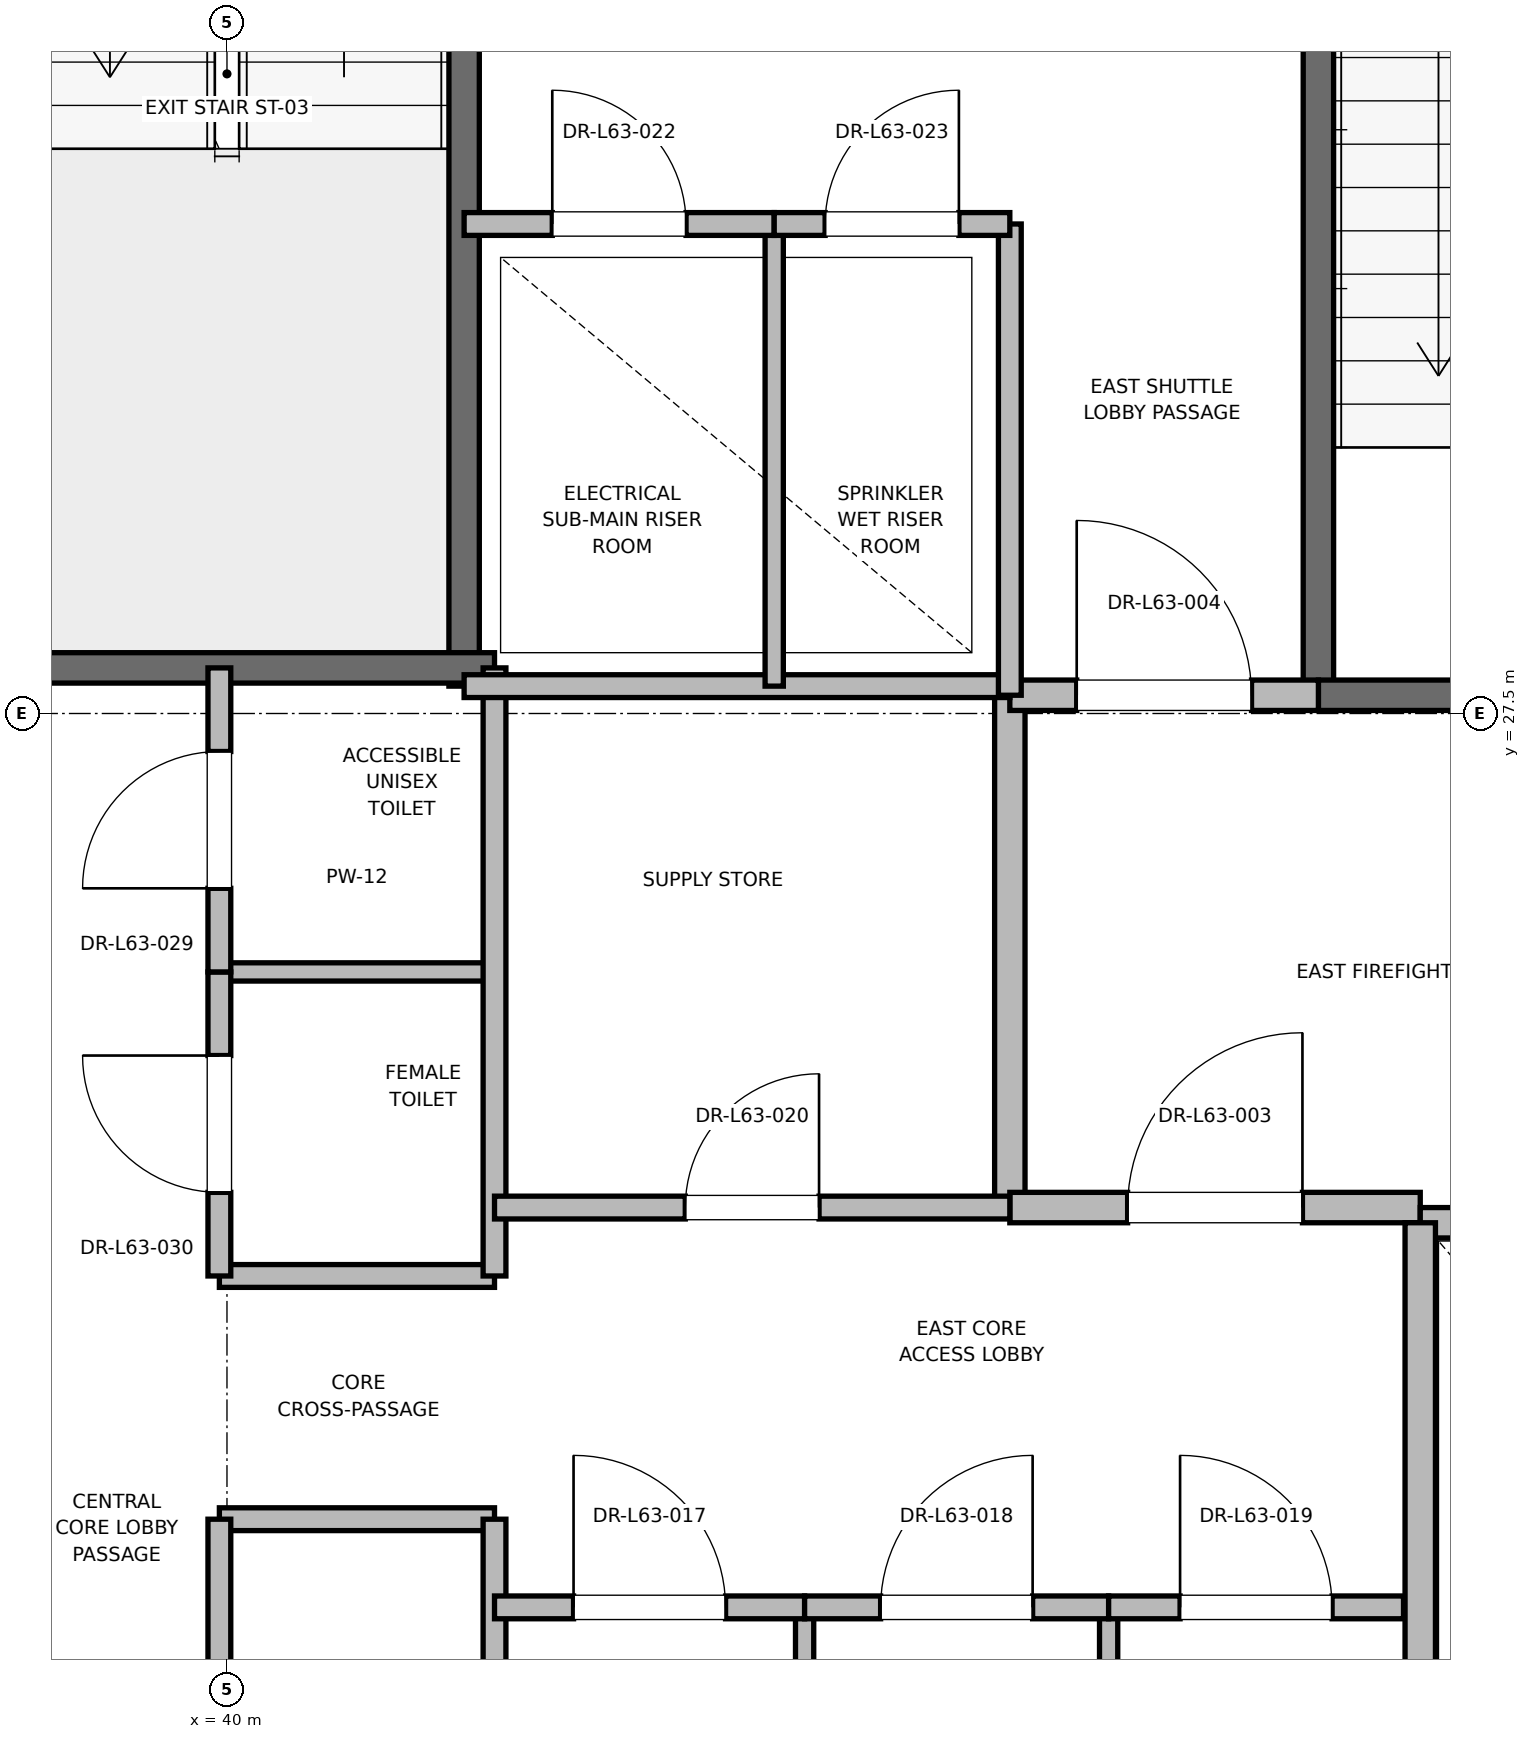
"""IFC4 building model, lengths in metres.
Left out: names, types, materials, properties, quantities, classifications, styles, units other than length and angle.
Written with IfcOpenShell. Run it as: python <this file> out.ifc"""

import sys

from ifc_helpers import new_model, si_unit, direction, frame, frame_2d, origin, place, context, subcontext, project, spatial, rectangle, extrude, element, fill, save


model = new_model("IFC4")
c1 = context("Model", 3, precision=1e-05, world=origin(), true_north=direction((0.0, 1.0)))
c2 = subcontext(c1, "Body", "Model", "MODEL_VIEW")
j1 = project(units=[si_unit("LENGTHUNIT", "METRE"), si_unit("PLANEANGLEUNIT", "RADIAN")], contexts=[c1])
p1 = place(None, origin())
s1 = spatial("IfcSite", under=j1, at=p1, CompositionType="ELEMENT")
p2 = place(p1, origin())
s2 = spatial("IfcBuilding", under=s1, at=p2, CompositionType="ELEMENT")
p3 = place(p2, frame((0.0, 0.0, 271.2)))
s3 = spatial("IfcBuildingStorey", under=s2, at=p3, CompositionType="ELEMENT", Elevation=271.2)
p4 = place(p3, frame((47.18, 27.62, 0.0), z_axis=(0.0, 0.0, 1.0), x_axis=(0.0, 1.0, 0.0)))
e1 = element("IfcWall", 1, at=p4, inside=s3, PredefinedType="SOLIDWALL", context=c2, shape_type="SweptSolid", body=[
    extrude(rectangle(XDim=8.18, YDim=0.2, at=frame_2d((4.09, 0.0))), origin(), (0.0, 0.0, 1.0), 3.785),
])
p5 = place(p3, frame((47.18, 27.62, 0.0), z_axis=(0.0, 0.0, 1.0), x_axis=(1.0, 0.0, 0.0)))
e2 = element("IfcWall", 2, at=p5, inside=s3, PredefinedType="SOLIDWALL", context=c2, shape_type="SweptSolid", body=[
    extrude(rectangle(XDim=3.12, YDim=0.2, at=frame_2d((1.56, 0.0))), origin(), (0.0, 0.0, 1.0), 3.785),
])
p6 = place(p5, frame((1.01, 0.0, 0.0)))
e3 = element("IfcOpeningElement", 3, at=p6, cuts=e2, PredefinedType="OPENING", context=c2, shape_type="SweptSolid", body=[
    extrude(rectangle(XDim=1.1, YDim=2.15, at=frame_2d((0.55, 1.075))), frame((0.0, 0.1, 0.0), z_axis=(0.0, -1.0, 0.0), x_axis=(1.0, 0.0, 0.0)), (0.0, 0.0, 1.0), 0.2),
])
p7 = place(p3, frame((41.56, 27.68, 0.0), z_axis=(0.0, 0.0, 1.0), x_axis=(0.0, 1.0, 0.0)))
e4 = element("IfcWall", 4, at=p7, inside=s3, PredefinedType="SOLIDWALL", context=c2, shape_type="SweptSolid", body=[
    extrude(rectangle(XDim=8.57, YDim=0.2, at=frame_2d((4.285, 0.0))), origin(), (0.0, 0.0, 1.0), 3.785),
])
p8 = place(p3, frame((38.44, 27.8, 0.0), z_axis=(0.0, 0.0, 1.0), x_axis=(1.0, 0.0, 0.0)))
e5 = element("IfcWall", 5, at=p8, inside=s3, PredefinedType="SOLIDWALL", context=c2, shape_type="SweptSolid", body=[
    extrude(rectangle(XDim=3.32, YDim=0.2, at=frame_2d((1.66, 0.0))), origin(), (0.0, 0.0, 1.0), 3.785),
])
p9 = place(p3, frame((45.15, 24.25, 0.0), z_axis=(0.0, 0.0, 1.0), x_axis=(0.0, 1.0, 0.0)))
e6 = element("IfcWall", 6, at=p9, inside=s3, PredefinedType="PARTITIONING", context=c2, shape_type="SweptSolid", body=[
    extrude(rectangle(XDim=3.37, YDim=0.2, at=frame_2d((1.685, 0.0))), origin(), (0.0, 0.0, 1.0), 3.785),
])
p10 = place(p3, frame((45.15, 24.25, 0.0), z_axis=(0.0, 0.0, 1.0), x_axis=(1.0, 0.0, 0.0)))
e7 = element("IfcWall", 7, at=p10, inside=s3, PredefinedType="PARTITIONING", context=c2, shape_type="SweptSolid", body=[
    extrude(rectangle(XDim=2.7, YDim=0.2, at=frame_2d((1.35, 0.0))), origin(), (0.0, 0.0, 1.0), 3.785),
])
p11 = place(p10, frame((0.775, 0.0, 0.0)))
e8 = element("IfcOpeningElement", 8, at=p11, cuts=e7, PredefinedType="OPENING", context=c2, shape_type="SweptSolid", body=[
    extrude(rectangle(XDim=1.15, YDim=2.2, at=frame_2d((0.575, 1.1))), frame((0.0, 0.1, 0.0), z_axis=(0.0, -1.0, 0.0), x_axis=(1.0, 0.0, 0.0)), (0.0, 0.0, 1.0), 0.2),
])
p12 = place(p3, frame((45.15, 27.62, 0.0), z_axis=(0.0, 0.0, 1.0), x_axis=(1.0, 0.0, 0.0)))
e9 = element("IfcWall", 9, at=p12, inside=s3, PredefinedType="PARTITIONING", context=c2, shape_type="SweptSolid", body=[
    extrude(rectangle(XDim=2.03, YDim=0.2, at=frame_2d((1.015, 0.0))), origin(), (0.0, 0.0, 1.0), 3.785),
])
p13 = place(p12, frame((0.44, 0.0, 0.0)))
e10 = element("IfcOpeningElement", 10, at=p13, cuts=e9, PredefinedType="OPENING", context=c2, shape_type="SweptSolid", body=[
    extrude(rectangle(XDim=1.15, YDim=2.2, at=frame_2d((0.575, 1.1))), frame((0.0, 0.1, 0.0), z_axis=(0.0, -1.0, 0.0), x_axis=(1.0, 0.0, 0.0)), (0.0, 0.0, 1.0), 0.2),
])
p14 = place(p3, frame((50.45, 24.15, 0.0), z_axis=(0.0, 0.0, 1.0), x_axis=(-1.0, 0.0, 0.0)))
e11 = element("IfcWall", 11, at=p14, inside=s3, PredefinedType="SOLIDWALL", context=c2, shape_type="SweptSolid", body=[
    extrude(rectangle(XDim=2.6, YDim=0.2, at=frame_2d((1.3, 0.0))), origin(), (0.0, 0.0, 1.0), 2.865),
])
p15 = place(p14, frame((0.75, 0.0, 0.0)))
e12 = element("IfcOpeningElement", 12, at=p15, cuts=e11, PredefinedType="OPENING", context=c2, shape_type="SweptSolid", body=[
    extrude(rectangle(XDim=1.1, YDim=2.2, at=frame_2d((0.55, 1.1))), frame((0.0, 0.1, 0.0), z_axis=(0.0, -1.0, 0.0), x_axis=(1.0, 0.0, 0.0)), (0.0, 0.0, 1.0), 0.2),
])
p16 = place(p3, frame((47.85, 24.15, 0.0), z_axis=(0.0, 0.0, 1.0), x_axis=(0.0, -1.0, 0.0)))
e13 = element("IfcWall", 13, at=p16, inside=s3, PredefinedType="SOLIDWALL", context=c2, shape_type="SweptSolid", body=[
    extrude(rectangle(XDim=3.0, YDim=0.2, at=frame_2d((1.5, 0.0))), origin(), (0.0, 0.0, 1.0), 3.785),
])
for number, where, z_axis, x_axis in (
    (14, (39.95, 22.2, 0.0), (0.0, 0.0, 1.0), (1.0, 0.0, 0.0)),
    (15, (39.95, 23.8, 0.0), (0.0, 0.0, 1.0), (1.0, 0.0, 0.0)),
):
    element("IfcWall", number, at=place(p3, frame(where, z_axis=z_axis, x_axis=x_axis)), inside=s3, PredefinedType="PARTITIONING", context=c2, shape_type="SweptSolid", body=[
        extrude(rectangle(XDim=1.81, YDim=0.15, at=frame_2d((0.905, 0.0))), origin(), (0.0, 0.0, 1.0), 2.85),
    ])
p17 = place(p3, frame((39.95, 25.8, 0.0), z_axis=(0.0, 0.0, 1.0), x_axis=(1.0, 0.0, 0.0)))
e16 = element("IfcWall", 16, at=p17, inside=s3, PredefinedType="PARTITIONING", context=c2, shape_type="SweptSolid", body=[
    extrude(rectangle(XDim=1.81, YDim=0.12, at=frame_2d((0.905, 0.0))), origin(), (0.0, 0.0, 1.0), 2.85),
])
p18 = place(p3, frame((41.76, 18.6, 0.0), z_axis=(0.0, 0.0, 1.0), x_axis=(0.0, 1.0, 0.0)))
e17 = element("IfcWall", 17, at=p18, inside=s3, PredefinedType="PARTITIONING", context=c2, shape_type="SweptSolid", body=[
    extrude(rectangle(XDim=3.6, YDim=0.15, at=frame_2d((1.8, 0.0))), origin(), (0.0, 0.0, 1.0), 2.85),
])
p19 = place(p3, frame((41.76, 23.8, 0.0), z_axis=(0.0, 0.0, 1.0), x_axis=(0.0, 1.0, 0.0)))
e18 = element("IfcWall", 18, at=p19, inside=s3, PredefinedType="PARTITIONING", context=c2, shape_type="SweptSolid", body=[
    extrude(rectangle(XDim=4.0, YDim=0.15, at=frame_2d((2.0, 0.0))), origin(), (0.0, 0.0, 1.0), 2.85),
])
p20 = place(p3, frame((39.95, 19.2, 0.0), z_axis=(0.0, 0.0, 1.0), x_axis=(0.0, 1.0, 0.0)))
e19 = element("IfcWall", 19, at=p20, inside=s3, PredefinedType="PARTITIONING", context=c2, shape_type="SweptSolid", body=[
    extrude(rectangle(XDim=3.0, YDim=0.15, at=frame_2d((1.5, 0.0))), origin(), (0.0, 0.0, 1.0), 2.85),
])
p21 = place(p20, frame((1.05, 0.0, 0.0)))
e20 = element("IfcOpeningElement", 20, at=p21, cuts=e19, PredefinedType="OPENING", context=c2, shape_type="SweptSolid", body=[
    extrude(rectangle(XDim=0.9, YDim=2.1, at=frame_2d((0.45, 1.05))), frame((0.0, 0.075, 0.0), z_axis=(0.0, -1.0, 0.0), x_axis=(1.0, 0.0, 0.0)), (0.0, 0.0, 1.0), 0.15),
])
p22 = place(p3, frame((39.95, 23.8, 0.0), z_axis=(0.0, 0.0, 1.0), x_axis=(0.0, 1.0, 0.0)))
e21 = element("IfcWall", 21, at=p22, inside=s3, PredefinedType="PARTITIONING", context=c2, shape_type="SweptSolid", body=[
    extrude(rectangle(XDim=2.0, YDim=0.15, at=frame_2d((1.0, 0.0))), origin(), (0.0, 0.0, 1.0), 2.85),
])
p23 = place(p22, frame((0.55, 0.0, 0.0)))
e22 = element("IfcOpeningElement", 22, at=p23, cuts=e21, PredefinedType="OPENING", context=c2, shape_type="SweptSolid", body=[
    extrude(rectangle(XDim=0.9, YDim=2.1, at=frame_2d((0.45, 1.05))), frame((0.0, 0.075, 0.0), z_axis=(0.0, -1.0, 0.0), x_axis=(1.0, 0.0, 0.0)), (0.0, 0.0, 1.0), 0.15),
])
p24 = place(p3, frame((39.95, 25.8, 0.0), z_axis=(0.0, 0.0, 1.0), x_axis=(0.0, 1.0, 0.0)))
e23 = element("IfcWall", 23, at=p24, inside=s3, PredefinedType="PARTITIONING", context=c2, shape_type="SweptSolid", body=[
    extrude(rectangle(XDim=2.0, YDim=0.15, at=frame_2d((1.0, 0.0))), origin(), (0.0, 0.0, 1.0), 2.85),
])
p25 = place(p24, frame((0.55, 0.0, 0.0)))
e24 = element("IfcOpeningElement", 24, at=p25, cuts=e23, PredefinedType="OPENING", context=c2, shape_type="SweptSolid", body=[
    extrude(rectangle(XDim=0.9, YDim=2.1, at=frame_2d((0.45, 1.05))), frame((0.0, 0.075, 0.0), z_axis=(0.0, -1.0, 0.0), x_axis=(1.0, 0.0, 0.0)), (0.0, 0.0, 1.0), 0.15),
])
p26 = place(p3, frame((41.56, 27.68, 0.0), z_axis=(0.0, 0.0, 1.0), x_axis=(1.0, 0.0, 0.0)))
e25 = element("IfcWall", 25, at=p26, inside=s3, PredefinedType="PARTITIONING", context=c2, shape_type="SweptSolid", body=[
    extrude(rectangle(XDim=3.59, YDim=0.15, at=frame_2d((1.795, 0.0))), origin(), (0.0, 0.0, 1.0), 2.85),
])
for number, where, z_axis, x_axis in (
    (26, (43.8, 18.6, 0.0), (0.0, 0.0, 1.0), (0.0, 1.0, 0.0)),
    (27, (45.8, 18.6, 0.0), (0.0, 0.0, 1.0), (0.0, 1.0, 0.0)),
):
    element("IfcWall", number, at=place(p3, frame(where, z_axis=z_axis, x_axis=x_axis)), inside=s3, PredefinedType="PARTITIONING", context=c2, shape_type="SweptSolid", body=[
        extrude(rectangle(XDim=3.02, YDim=0.12, at=frame_2d((1.51, 0.0))), origin(), (0.0, 0.0, 1.0), 2.85),
    ])
p27 = place(p3, frame((41.76, 21.62, 0.0), z_axis=(0.0, 0.0, 1.0), x_axis=(1.0, 0.0, 0.0)))
e28 = element("IfcWall", 28, at=p27, inside=s3, PredefinedType="PARTITIONING", context=c2, shape_type="SweptSolid", body=[
    extrude(rectangle(XDim=2.04, YDim=0.15, at=frame_2d((1.02, 0.0))), origin(), (0.0, 0.0, 1.0), 2.85),
])
p28 = place(p27, frame((0.52, 0.0, 0.0)))
e29 = element("IfcOpeningElement", 29, at=p28, cuts=e28, PredefinedType="OPENING", context=c2, shape_type="SweptSolid", body=[
    extrude(rectangle(XDim=1.0, YDim=2.15, at=frame_2d((0.5, 1.075))), frame((0.0, 0.075, 0.0), z_axis=(0.0, -1.0, 0.0), x_axis=(1.0, 0.0, 0.0)), (0.0, 0.0, 1.0), 0.15),
])
p29 = place(p3, frame((43.8, 21.62, 0.0), z_axis=(0.0, 0.0, 1.0), x_axis=(1.0, 0.0, 0.0)))
e30 = element("IfcWall", 30, at=p29, inside=s3, PredefinedType="PARTITIONING", context=c2, shape_type="SweptSolid", body=[
    extrude(rectangle(XDim=2.0, YDim=0.15, at=frame_2d((1.0, 0.0))), origin(), (0.0, 0.0, 1.0), 2.85),
])
p30 = place(p29, frame((0.5, 0.0, 0.0)))
e31 = element("IfcOpeningElement", 31, at=p30, cuts=e30, PredefinedType="OPENING", context=c2, shape_type="SweptSolid", body=[
    extrude(rectangle(XDim=1.0, YDim=2.15, at=frame_2d((0.5, 1.075))), frame((0.0, 0.075, 0.0), z_axis=(0.0, -1.0, 0.0), x_axis=(1.0, 0.0, 0.0)), (0.0, 0.0, 1.0), 0.15),
])
p31 = place(p3, frame((45.8, 21.62, 0.0), z_axis=(0.0, 0.0, 1.0), x_axis=(1.0, 0.0, 0.0)))
e32 = element("IfcWall", 32, at=p31, inside=s3, PredefinedType="PARTITIONING", context=c2, shape_type="SweptSolid", body=[
    extrude(rectangle(XDim=1.94, YDim=0.15, at=frame_2d((0.97, 0.0))), origin(), (0.0, 0.0, 1.0), 2.85),
])
p32 = place(p31, frame((0.47, 0.0, 0.0)))
e33 = element("IfcOpeningElement", 33, at=p32, cuts=e32, PredefinedType="OPENING", context=c2, shape_type="SweptSolid", body=[
    extrude(rectangle(XDim=1.0, YDim=2.15, at=frame_2d((0.5, 1.075))), frame((0.0, 0.075, 0.0), z_axis=(0.0, -1.0, 0.0), x_axis=(1.0, 0.0, 0.0)), (0.0, 0.0, 1.0), 0.15),
])
p33 = place(p3, frame((41.76, 24.25, 0.0), z_axis=(0.0, 0.0, 1.0), x_axis=(1.0, 0.0, 0.0)))
e34 = element("IfcWall", 34, at=p33, inside=s3, PredefinedType="PARTITIONING", context=c2, shape_type="SweptSolid", body=[
    extrude(rectangle(XDim=3.39, YDim=0.15, at=frame_2d((1.695, 0.0))), origin(), (0.0, 0.0, 1.0), 2.85),
])
p34 = place(p33, frame((1.255, 0.0, 0.0)))
e35 = element("IfcOpeningElement", 35, at=p34, cuts=e34, PredefinedType="OPENING", context=c2, shape_type="SweptSolid", body=[
    extrude(rectangle(XDim=0.88, YDim=2.1, at=frame_2d((0.44, 1.05))), frame((0.0, 0.075, 0.0), z_axis=(0.0, -1.0, 0.0), x_axis=(1.0, 0.0, 0.0)), (0.0, 0.0, 1.0), 0.15),
])
p35 = place(p3, frame((45.15, 27.62, 0.0), z_axis=(0.0, 0.0, 1.0), x_axis=(0.0, 1.0, 0.0)))
e36 = element("IfcWall", 36, at=p35, inside=s3, PredefinedType="PARTITIONING", context=c2, shape_type="SweptSolid", body=[
    extrude(rectangle(XDim=3.1, YDim=0.15, at=frame_2d((1.55, 0.0))), origin(), (0.0, 0.0, 1.0), 2.85),
])
p36 = place(p3, frame((43.6, 27.68, 0.0), z_axis=(0.0, 0.0, 1.0), x_axis=(0.0, 1.0, 0.0)))
e37 = element("IfcWall", 37, at=p36, inside=s3, PredefinedType="PARTITIONING", context=c2, shape_type="SweptSolid", body=[
    extrude(rectangle(XDim=3.04, YDim=0.12, at=frame_2d((1.52, 0.0))), origin(), (0.0, 0.0, 1.0), 2.85),
])
p37 = place(p3, frame((41.56, 30.72, 0.0), z_axis=(0.0, 0.0, 1.0), x_axis=(1.0, 0.0, 0.0)))
e38 = element("IfcWall", 38, at=p37, inside=s3, PredefinedType="PARTITIONING", context=c2, shape_type="SweptSolid", body=[
    extrude(rectangle(XDim=2.04, YDim=0.15, at=frame_2d((1.02, 0.0))), origin(), (0.0, 0.0, 1.0), 2.85),
])
p38 = place(p37, frame((0.58, 0.0, 0.0)))
e39 = element("IfcOpeningElement", 39, at=p38, cuts=e38, PredefinedType="OPENING", context=c2, shape_type="SweptSolid", body=[
    extrude(rectangle(XDim=0.88, YDim=2.1, at=frame_2d((0.44, 1.05))), frame((0.0, 0.075, 0.0), z_axis=(0.0, -1.0, 0.0), x_axis=(1.0, 0.0, 0.0)), (0.0, 0.0, 1.0), 0.15),
])
p39 = place(p3, frame((43.6, 30.72, 0.0), z_axis=(0.0, 0.0, 1.0), x_axis=(1.0, 0.0, 0.0)))
e40 = element("IfcWall", 40, at=p39, inside=s3, PredefinedType="PARTITIONING", context=c2, shape_type="SweptSolid", body=[
    extrude(rectangle(XDim=1.55, YDim=0.15, at=frame_2d((0.775, 0.0))), origin(), (0.0, 0.0, 1.0), 2.85),
])
p40 = place(p39, frame((0.335, 0.0, 0.0)))
e41 = element("IfcOpeningElement", 41, at=p40, cuts=e40, PredefinedType="OPENING", context=c2, shape_type="SweptSolid", body=[
    extrude(rectangle(XDim=0.88, YDim=2.1, at=frame_2d((0.44, 1.05))), frame((0.0, 0.075, 0.0), z_axis=(0.0, -1.0, 0.0), x_axis=(1.0, 0.0, 0.0)), (0.0, 0.0, 1.0), 0.15),
])
p41 = place(p11, origin())
e42 = element("IfcDoor", 42, at=p41, inside=s3, OperationType="SINGLE_SWING_RIGHT", PredefinedType="DOOR", context=c2, shape_type="SweptSolid", body=[
    extrude(rectangle(XDim=1.15, YDim=2.2, at=frame_2d((0.575, 1.1))), frame((0.0, 0.025, 0.0), z_axis=(0.0, -1.0, 0.0), x_axis=(1.0, 0.0, 0.0)), (0.0, 0.0, 1.0), 0.05),
])
fill(e8, e42)
p42 = place(p13, origin())
e43 = element("IfcDoor", 43, at=p42, inside=s3, OperationType="SINGLE_SWING_LEFT", PredefinedType="DOOR", context=c2, shape_type="SweptSolid", body=[
    extrude(rectangle(XDim=1.15, YDim=2.2, at=frame_2d((0.575, 1.1))), frame((0.0, 0.025, 0.0), z_axis=(0.0, -1.0, 0.0), x_axis=(1.0, 0.0, 0.0)), (0.0, 0.0, 1.0), 0.05),
])
fill(e10, e43)
p43 = place(p23, origin())
e44 = element("IfcDoor", 44, at=p43, inside=s3, OperationType="SINGLE_SWING_RIGHT", PredefinedType="DOOR", context=c2, shape_type="SweptSolid", body=[
    extrude(rectangle(XDim=0.9, YDim=2.1, at=frame_2d((0.45, 1.05))), frame((0.0, 0.025, 0.0), z_axis=(0.0, -1.0, 0.0), x_axis=(1.0, 0.0, 0.0)), (0.0, 0.0, 1.0), 0.05),
])
fill(e22, e44)
p44 = place(p25, origin())
e45 = element("IfcDoor", 45, at=p44, inside=s3, OperationType="SINGLE_SWING_LEFT", PredefinedType="DOOR", context=c2, shape_type="SweptSolid", body=[
    extrude(rectangle(XDim=0.9, YDim=2.1, at=frame_2d((0.45, 1.05))), frame((0.0, 0.025, 0.0), z_axis=(0.0, -1.0, 0.0), x_axis=(1.0, 0.0, 0.0)), (0.0, 0.0, 1.0), 0.05),
])
fill(e24, e45)
p45 = place(p28, origin())
e46 = element("IfcDoor", 46, at=p45, inside=s3, OperationType="SINGLE_SWING_LEFT", PredefinedType="DOOR", context=c2, shape_type="SweptSolid", body=[
    extrude(rectangle(XDim=1.0, YDim=2.15, at=frame_2d((0.5, 1.075))), frame((0.0, 0.025, 0.0), z_axis=(0.0, -1.0, 0.0), x_axis=(1.0, 0.0, 0.0)), (0.0, 0.0, 1.0), 0.05),
])
fill(e29, e46)
p46 = place(p30, origin())
e47 = element("IfcDoor", 47, at=p46, inside=s3, OperationType="SINGLE_SWING_RIGHT", PredefinedType="DOOR", context=c2, shape_type="SweptSolid", body=[
    extrude(rectangle(XDim=1.0, YDim=2.15, at=frame_2d((0.5, 1.075))), frame((0.0, 0.025, 0.0), z_axis=(0.0, -1.0, 0.0), x_axis=(1.0, 0.0, 0.0)), (0.0, 0.0, 1.0), 0.05),
])
fill(e31, e47)
p47 = place(p32, origin())
e48 = element("IfcDoor", 48, at=p47, inside=s3, OperationType="SINGLE_SWING_LEFT", PredefinedType="DOOR", context=c2, shape_type="SweptSolid", body=[
    extrude(rectangle(XDim=1.0, YDim=2.15, at=frame_2d((0.5, 1.075))), frame((0.0, 0.025, 0.0), z_axis=(0.0, -1.0, 0.0), x_axis=(1.0, 0.0, 0.0)), (0.0, 0.0, 1.0), 0.05),
])
fill(e33, e48)
p48 = place(p34, origin())
e49 = element("IfcDoor", 49, at=p48, inside=s3, OperationType="SINGLE_SWING_RIGHT", PredefinedType="DOOR", context=c2, shape_type="SweptSolid", body=[
    extrude(rectangle(XDim=0.88, YDim=2.1, at=frame_2d((0.44, 1.05))), frame((0.0, 0.025, 0.0), z_axis=(0.0, -1.0, 0.0), x_axis=(1.0, 0.0, 0.0)), (0.0, 0.0, 1.0), 0.05),
])
fill(e35, e49)
p49 = place(p38, origin())
e50 = element("IfcDoor", 50, at=p49, inside=s3, OperationType="SINGLE_SWING_LEFT", PredefinedType="DOOR", context=c2, shape_type="SweptSolid", body=[
    extrude(rectangle(XDim=0.88, YDim=2.1, at=frame_2d((0.44, 1.05))), frame((0.0, 0.025, 0.0), z_axis=(0.0, -1.0, 0.0), x_axis=(1.0, 0.0, 0.0)), (0.0, 0.0, 1.0), 0.05),
])
fill(e39, e50)
p50 = place(p40, origin())
e51 = element("IfcDoor", 51, at=p50, inside=s3, OperationType="SINGLE_SWING_RIGHT", PredefinedType="DOOR", context=c2, shape_type="SweptSolid", body=[
    extrude(rectangle(XDim=0.88, YDim=2.1, at=frame_2d((0.44, 1.05))), frame((0.0, 0.025, 0.0), z_axis=(0.0, -1.0, 0.0), x_axis=(1.0, 0.0, 0.0)), (0.0, 0.0, 1.0), 0.05),
])
fill(e41, e51)
save(model, sys.argv[1])
